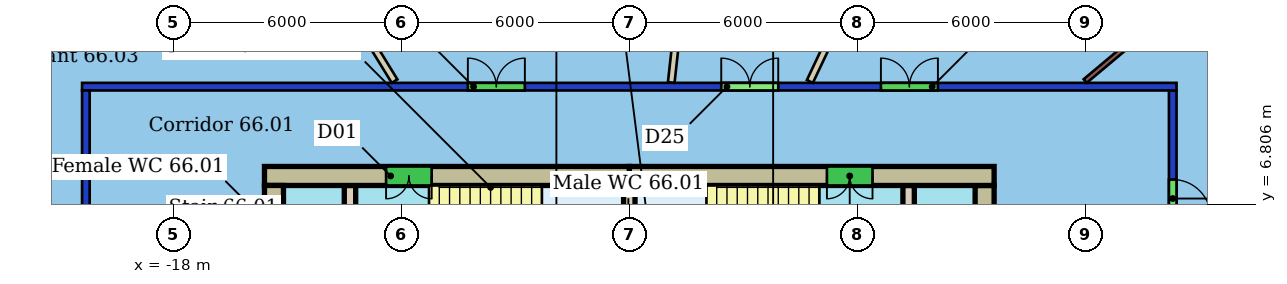
"""IFC4 building model, lengths in metres.
Left out: names, types, materials, properties, quantities, classifications, styles, units other than length and angle.
Written with IfcOpenShell. Run it as: python <this file> out.ifc"""

import sys

from ifc_helpers import new_model, si_unit, direction, frame, frame_2d, origin, place, context, subcontext, project, spatial, rectangle, extrude, element, fill, save


model = new_model("IFC4")
c1 = context("Model", 3, precision=1e-05, world=origin(), true_north=direction((0.0, 1.0)))
c2 = subcontext(c1, "Body", "Model", "MODEL_VIEW")
j1 = project(units=[si_unit("LENGTHUNIT", "METRE"), si_unit("PLANEANGLEUNIT", "RADIAN")], contexts=[c1])
p1 = place(None, origin())
s1 = spatial("IfcSite", under=j1, at=p1, CompositionType="ELEMENT")
p2 = place(p1, origin())
s2 = spatial("IfcBuilding", under=s1, at=p2, CompositionType="ELEMENT")
p3 = place(p2, frame((0.0, 0.0, 268.5)))
s3 = spatial("IfcBuildingStorey", under=s2, at=p3, CompositionType="ELEMENT", Elevation=268.5)
p4 = place(p3, frame((-20.3, -9.8, 0.0), z_axis=(0.0, 0.0, 1.0), x_axis=(0.0, 1.0, 0.0)))
e1 = element("IfcWall", 1, at=p4, inside=s3, PredefinedType="PARTITIONING", context=c2, shape_type="SweptSolid", body=[
    extrude(rectangle(XDim=19.6, YDim=0.2, at=frame_2d((9.8, 0.0))), origin(), (0.0, 0.0, 1.0), 3.1),
])
p5 = place(p4, frame((13.312, 0.0, 0.0)))
e2 = element("IfcOpeningElement", 2, at=p5, cuts=e1, PredefinedType="OPENING", context=c2, shape_type="SweptSolid", body=[
    extrude(rectangle(XDim=1.5, YDim=2.4, at=frame_2d((0.75, 1.2))), frame((0.0, 0.11, 0.0), z_axis=(0.0, -1.0, 0.0), x_axis=(1.0, 0.0, 0.0)), (0.0, 0.0, 1.0), 0.22),
])
p6 = place(p4, frame((6.152, 0.0, 0.0)))
e3 = element("IfcOpeningElement", 3, at=p6, cuts=e1, PredefinedType="OPENING", context=c2, shape_type="SweptSolid", body=[
    extrude(rectangle(XDim=1.8, YDim=2.1, at=frame_2d((0.9, 1.05))), frame((0.0, 0.11, 0.0), z_axis=(0.0, -1.0, 0.0), x_axis=(1.0, 0.0, 0.0)), (0.0, 0.0, 1.0), 0.22),
])
p7 = place(p3, frame((-20.4, 9.9, 0.0), z_axis=(0.0, 0.0, 1.0), x_axis=(1.0, 0.0, 0.0)))
e4 = element("IfcWall", 4, at=p7, inside=s3, PredefinedType="PARTITIONING", context=c2, shape_type="SweptSolid", body=[
    extrude(rectangle(XDim=28.8, YDim=0.2, at=frame_2d((14.4, 0.0))), origin(), (0.0, 0.0, 1.0), 3.1),
])
p8 = place(p7, frame((16.82, 0.0, 0.0)))
e5 = element("IfcOpeningElement", 5, at=p8, cuts=e4, PredefinedType="OPENING", context=c2, shape_type="SweptSolid", body=[
    extrude(rectangle(XDim=1.5, YDim=2.4, at=frame_2d((0.75, 1.2))), frame((0.0, 0.11, 0.0), z_axis=(0.0, -1.0, 0.0), x_axis=(1.0, 0.0, 0.0)), (0.0, 0.0, 1.0), 0.22),
])
p9 = place(p7, frame((10.152, 0.0, 0.0)))
e6 = element("IfcOpeningElement", 6, at=p9, cuts=e4, PredefinedType="OPENING", context=c2, shape_type="SweptSolid", body=[
    extrude(rectangle(XDim=1.5, YDim=2.1, at=frame_2d((0.75, 1.05))), frame((0.0, 0.11, 0.0), z_axis=(0.0, -1.0, 0.0), x_axis=(1.0, 0.0, 0.0)), (0.0, 0.0, 1.0), 0.22),
])
p10 = place(p7, frame((21.021, 0.0, 0.0)))
e7 = element("IfcOpeningElement", 7, at=p10, cuts=e4, PredefinedType="OPENING", context=c2, shape_type="SweptSolid", body=[
    extrude(rectangle(XDim=1.5, YDim=2.1, at=frame_2d((0.75, 1.05))), frame((0.0, 0.11, 0.0), z_axis=(0.0, -1.0, 0.0), x_axis=(1.0, 0.0, 0.0)), (0.0, 0.0, 1.0), 0.22),
])
p11 = place(p3, frame((8.3, 9.8, 0.0), z_axis=(0.0, 0.0, 1.0), x_axis=(0.0, -1.0, 0.0)))
e8 = element("IfcWall", 8, at=p11, inside=s3, PredefinedType="PARTITIONING", context=c2, shape_type="SweptSolid", body=[
    extrude(rectangle(XDim=19.6, YDim=0.2, at=frame_2d((9.8, 0.0))), origin(), (0.0, 0.0, 1.0), 3.1),
])
p12 = place(p11, frame((7.671, 0.0, 0.0)))
e9 = element("IfcOpeningElement", 9, at=p12, cuts=e8, PredefinedType="OPENING", context=c2, shape_type="SweptSolid", body=[
    extrude(rectangle(XDim=1.8, YDim=2.4, at=frame_2d((0.9, 1.2))), frame((0.0, 0.11, 0.0), z_axis=(0.0, -1.0, 0.0), x_axis=(1.0, 0.0, 0.0)), (0.0, 0.0, 1.0), 0.22),
])
p13 = place(p11, frame((2.344, 0.0, 0.0)))
e10 = element("IfcOpeningElement", 10, at=p13, cuts=e8, PredefinedType="OPENING", context=c2, shape_type="SweptSolid", body=[
    extrude(rectangle(XDim=1.0, YDim=2.4, at=frame_2d((0.5, 1.2))), frame((0.0, 0.11, 0.0), z_axis=(0.0, -1.0, 0.0), x_axis=(1.0, 0.0, 0.0)), (0.0, 0.0, 1.0), 0.22),
])
p14 = place(p3, frame((4.876, 22.974, 0.0), z_axis=(0.0, 0.0, 1.0), x_axis=(-0.427862697132, -0.903843743356, 0.0)))
e11 = element("IfcWall", 11, at=p14, inside=s3, PredefinedType="PARTITIONING", context=c2, shape_type="SweptSolid", body=[
    extrude(rectangle(XDim=14.313, YDim=0.175, at=frame_2d((7.156, 0.0))), origin(), (0.0, 0.0, 1.0), 3.45),
])
p15 = place(p3, frame((-3.325, 24.263, 0.0), z_axis=(0.0, 0.0, 1.0), x_axis=(-0.109594321607, -0.99397640046, 0.0)))
e12 = element("IfcWall", 12, at=p15, inside=s3, PredefinedType="PARTITIONING", context=c2, shape_type="SweptSolid", body=[
    extrude(rectangle(XDim=14.34, YDim=0.175, at=frame_2d((7.17, 0.0))), origin(), (0.0, 0.0, 1.0), 3.45),
])
p16 = place(p3, frame((-17.294, 18.369, 0.0), z_axis=(0.0, 0.0, 1.0), x_axis=(0.523780906065, -0.851853016924, 0.0)))
e13 = element("IfcWall", 13, at=p16, inside=s3, PredefinedType="PARTITIONING", context=c2, shape_type="SweptSolid", body=[
    extrude(rectangle(XDim=9.77, YDim=0.175, at=frame_2d((4.885, 0.0))), origin(), (0.0, 0.0, 1.0), 3.45),
])
p17 = place(p3, frame((15.949, 7.744, 0.0), z_axis=(0.0, 0.0, 1.0), x_axis=(-0.943031701319, -0.332702885933, 0.0)))
e14 = element("IfcWall", 14, at=p17, inside=s3, PredefinedType="PARTITIONING", context=c2, shape_type="SweptSolid", body=[
    extrude(rectangle(XDim=7.952, YDim=0.3, at=frame_2d((3.976, 0.0))), origin(), (0.0, 0.0, 1.0), 3.45),
])
p18 = place(p3, frame((13.061, 15.965, 0.0), z_axis=(0.0, 0.0, 1.0), x_axis=(-0.766607537876, -0.642115941923, 0.0)))
e15 = element("IfcWall", 15, at=p18, inside=s3, PredefinedType="PARTITIONING", context=c2, shape_type="SweptSolid", body=[
    extrude(rectangle(XDim=9.215, YDim=0.125, at=frame_2d((4.608, 0.0))), origin(), (0.0, 0.0, 1.0), 3.45),
])
p19 = place(p3, frame((3.6, 7.55, 0.0), z_axis=(0.0, 0.0, 1.0), x_axis=(-1.0, 0.0, 0.0)))
e16 = element("IfcWall", 16, at=p19, inside=s3, PredefinedType="SHEAR", context=c2, shape_type="SweptSolid", body=[
    extrude(rectangle(XDim=9.6, YDim=0.5, at=frame_2d((4.8, 0.0))), origin(), (0.0, 0.0, 1.0), 3.3),
])
p20 = place(p19, frame((3.2, 0.0, 0.0)))
e17 = element("IfcOpeningElement", 17, at=p20, cuts=e16, PredefinedType="OPENING", context=c2, shape_type="SweptSolid", body=[
    extrude(rectangle(XDim=1.2, YDim=2.1, at=frame_2d((0.6, 1.05))), frame((0.0, 0.26, 0.0), z_axis=(0.0, -1.0, 0.0), x_axis=(1.0, 0.0, 0.0)), (0.0, 0.0, 1.0), 0.52),
])
p21 = place(p3, frame((-6.0, 7.55, 0.0), z_axis=(0.0, 0.0, 1.0), x_axis=(-1.0, 0.0, 0.0)))
e18 = element("IfcWall", 18, at=p21, inside=s3, PredefinedType="SHEAR", context=c2, shape_type="SweptSolid", body=[
    extrude(rectangle(XDim=9.6, YDim=0.5, at=frame_2d((4.8, 0.0))), origin(), (0.0, 0.0, 1.0), 3.3),
])
p22 = place(p21, frame((5.2, 0.0, 0.0)))
e19 = element("IfcOpeningElement", 19, at=p22, cuts=e18, PredefinedType="OPENING", context=c2, shape_type="SweptSolid", body=[
    extrude(rectangle(XDim=1.2, YDim=2.1, at=frame_2d((0.6, 1.05))), frame((0.0, 0.26, 0.0), z_axis=(0.0, -1.0, 0.0), x_axis=(1.0, 0.0, 0.0)), (0.0, 0.0, 1.0), 0.52),
])
p23 = place(p3, frame((-15.35, 7.3, 0.0), z_axis=(0.0, 0.0, 1.0), x_axis=(0.0, -1.0, 0.0)))
e20 = element("IfcWall", 20, at=p23, inside=s3, PredefinedType="SHEAR", context=c2, shape_type="SweptSolid", body=[
    extrude(rectangle(XDim=14.6, YDim=0.5, at=frame_2d((7.3, 0.0))), origin(), (0.0, 0.0, 1.0), 3.3),
])
p24 = place(p23, frame((10.6, 0.0, 0.0)))
e21 = element("IfcOpeningElement", 21, at=p24, cuts=e20, PredefinedType="OPENING", context=c2, shape_type="SweptSolid", body=[
    extrude(rectangle(XDim=1.2, YDim=2.1, at=frame_2d((0.6, 1.05))), frame((0.0, 0.26, 0.0), z_axis=(0.0, -1.0, 0.0), x_axis=(1.0, 0.0, 0.0)), (0.0, 0.0, 1.0), 0.52),
])
p25 = place(p23, frame((2.8, 0.0, 0.0)))
e22 = element("IfcOpeningElement", 22, at=p25, cuts=e20, PredefinedType="OPENING", context=c2, shape_type="SweptSolid", body=[
    extrude(rectangle(XDim=1.2, YDim=2.1, at=frame_2d((0.6, 1.05))), frame((0.0, 0.26, 0.0), z_axis=(0.0, -1.0, 0.0), x_axis=(1.0, 0.0, 0.0)), (0.0, 0.0, 1.0), 0.52),
])
p26 = place(p3, frame((3.35, -7.3, 0.0), z_axis=(0.0, 0.0, 1.0), x_axis=(0.0, 1.0, 0.0)))
e23 = element("IfcWall", 23, at=p26, inside=s3, PredefinedType="SHEAR", context=c2, shape_type="SweptSolid", body=[
    extrude(rectangle(XDim=14.6, YDim=0.5, at=frame_2d((7.3, 0.0))), origin(), (0.0, 0.0, 1.0), 3.3),
])
p27 = place(p26, frame((2.8, 0.0, 0.0)))
e24 = element("IfcOpeningElement", 24, at=p27, cuts=e23, PredefinedType="OPENING", context=c2, shape_type="SweptSolid", body=[
    extrude(rectangle(XDim=1.2, YDim=2.1, at=frame_2d((0.6, 1.05))), frame((0.0, 0.26, 0.0), z_axis=(0.0, -1.0, 0.0), x_axis=(1.0, 0.0, 0.0)), (0.0, 0.0, 1.0), 0.52),
])
p28 = place(p26, frame((10.6, 0.0, 0.0)))
e25 = element("IfcOpeningElement", 25, at=p28, cuts=e23, PredefinedType="OPENING", context=c2, shape_type="SweptSolid", body=[
    extrude(rectangle(XDim=1.2, YDim=2.1, at=frame_2d((0.6, 1.05))), frame((0.0, 0.26, 0.0), z_axis=(0.0, -1.0, 0.0), x_axis=(1.0, 0.0, 0.0)), (0.0, 0.0, 1.0), 0.52),
])
p29 = place(p3, frame((-13.35, 7.3, 0.0), z_axis=(0.0, 0.0, 1.0), x_axis=(0.0, -1.0, 0.0)))
e26 = element("IfcWall", 26, at=p29, inside=s3, PredefinedType="SHEAR", context=c2, shape_type="SweptSolid", body=[
    extrude(rectangle(XDim=14.6, YDim=0.3, at=frame_2d((7.3, 0.0))), origin(), (0.0, 0.0, 1.0), 3.3),
])
p30 = place(p29, frame((6.55, 0.0, 0.0)))
e27 = element("IfcOpeningElement", 27, at=p30, cuts=e26, PredefinedType="OPENING", context=c2, shape_type="SweptSolid", body=[
    extrude(rectangle(XDim=1.5, YDim=2.1, at=frame_2d((0.75, 1.05))), frame((0.0, 0.16, 0.0), z_axis=(0.0, -1.0, 0.0), x_axis=(1.0, 0.0, 0.0)), (0.0, 0.0, 1.0), 0.32),
])
p31 = place(p3, frame((1.35, -7.3, 0.0), z_axis=(0.0, 0.0, 1.0), x_axis=(0.0, 1.0, 0.0)))
e28 = element("IfcWall", 28, at=p31, inside=s3, PredefinedType="SHEAR", context=c2, shape_type="SweptSolid", body=[
    extrude(rectangle(XDim=14.6, YDim=0.3, at=frame_2d((7.3, 0.0))), origin(), (0.0, 0.0, 1.0), 3.3),
])
p32 = place(p31, frame((1.21, 0.0, 0.0)))
e29 = element("IfcOpeningElement", 29, at=p32, cuts=e28, PredefinedType="OPENING", context=c2, shape_type="SweptSolid", body=[
    extrude(rectangle(XDim=1.0, YDim=2.1, at=frame_2d((0.5, 1.05))), frame((0.0, 0.16, 0.0), z_axis=(0.0, -1.0, 0.0), x_axis=(1.0, 0.0, 0.0)), (0.0, 0.0, 1.0), 0.32),
])
p33 = place(p31, frame((6.55, 0.0, 0.0)))
e30 = element("IfcOpeningElement", 30, at=p33, cuts=e28, PredefinedType="OPENING", context=c2, shape_type="SweptSolid", body=[
    extrude(rectangle(XDim=1.5, YDim=2.1, at=frame_2d((0.75, 1.05))), frame((0.0, 0.16, 0.0), z_axis=(0.0, -1.0, 0.0), x_axis=(1.0, 0.0, 0.0)), (0.0, 0.0, 1.0), 0.32),
])
p34 = place(p3, frame((-6.0, 3.88, 0.0), z_axis=(0.0, 0.0, 1.0), x_axis=(0.0, 1.0, 0.0)))
e31 = element("IfcWall", 31, at=p34, inside=s3, PredefinedType="SHEAR", context=c2, shape_type="SweptSolid", body=[
    extrude(rectangle(XDim=3.42, YDim=0.3, at=frame_2d((1.71, 0.0))), origin(), (0.0, 0.0, 1.0), 3.3),
])
p35 = place(p8, origin())
e32 = element("IfcDoor", 32, at=p35, inside=s3, OperationType="DOUBLE_DOOR_SINGLE_SWING", PredefinedType="DOOR", context=c2, shape_type="SweptSolid", body=[
    extrude(rectangle(XDim=1.5, YDim=2.4, at=frame_2d((0.75, 1.2))), frame((0.0, 0.025, 0.0), z_axis=(0.0, -1.0, 0.0), x_axis=(1.0, 0.0, 0.0)), (0.0, 0.0, 1.0), 0.05),
])
fill(e5, e32)
p36 = place(p9, origin())
e33 = element("IfcDoor", 33, at=p36, inside=s3, OperationType="DOUBLE_DOOR_SINGLE_SWING", PredefinedType="DOOR", context=c2, shape_type="SweptSolid", body=[
    extrude(rectangle(XDim=1.5, YDim=2.1, at=frame_2d((0.75, 1.05))), frame((0.0, 0.025, 0.0), z_axis=(0.0, -1.0, 0.0), x_axis=(1.0, 0.0, 0.0)), (0.0, 0.0, 1.0), 0.05),
])
fill(e6, e33)
p37 = place(p13, origin())
e34 = element("IfcDoor", 34, at=p37, inside=s3, OperationType="SINGLE_SWING_RIGHT", PredefinedType="DOOR", context=c2, shape_type="SweptSolid", body=[
    extrude(rectangle(XDim=1.0, YDim=2.4, at=frame_2d((0.5, 1.2))), frame((0.0, 0.025, 0.0), z_axis=(0.0, -1.0, 0.0), x_axis=(1.0, 0.0, 0.0)), (0.0, 0.0, 1.0), 0.05),
])
fill(e10, e34)
p38 = place(p10, origin())
e35 = element("IfcDoor", 35, at=p38, inside=s3, OperationType="DOUBLE_DOOR_SINGLE_SWING", PredefinedType="DOOR", context=c2, shape_type="SweptSolid", body=[
    extrude(rectangle(XDim=1.5, YDim=2.1, at=frame_2d((0.75, 1.05))), frame((0.0, 0.025, 0.0), z_axis=(0.0, -1.0, 0.0), x_axis=(1.0, 0.0, 0.0)), (0.0, 0.0, 1.0), 0.05),
])
fill(e7, e35)
p39 = place(p20, origin())
e36 = element("IfcDoor", 36, at=p39, inside=s3, OperationType="DOUBLE_DOOR_SINGLE_SWING", PredefinedType="NOTDEFINED", context=c2, shape_type="SweptSolid", body=[
    extrude(rectangle(XDim=1.2, YDim=2.1, at=frame_2d((0.6, 1.05))), frame((0.0, 0.025, 0.0), z_axis=(0.0, -1.0, 0.0), x_axis=(1.0, 0.0, 0.0)), (0.0, 0.0, 1.0), 0.05),
])
fill(e17, e36)
p40 = place(p22, origin())
e37 = element("IfcDoor", 37, at=p40, inside=s3, OperationType="DOUBLE_DOOR_SINGLE_SWING", PredefinedType="NOTDEFINED", context=c2, shape_type="SweptSolid", body=[
    extrude(rectangle(XDim=1.2, YDim=2.1, at=frame_2d((0.6, 1.05))), frame((0.0, 0.025, 0.0), z_axis=(0.0, -1.0, 0.0), x_axis=(1.0, 0.0, 0.0)), (0.0, 0.0, 1.0), 0.05),
])
fill(e19, e37)
save(model, sys.argv[1])
